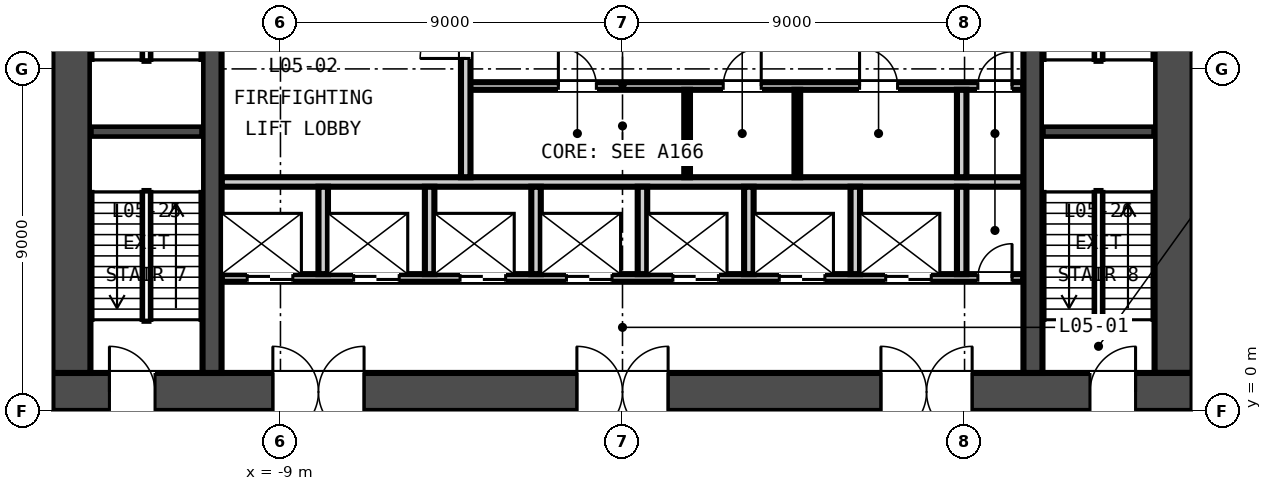
"""IFC4 building model, lengths in metres.
Left out: names, types, materials, properties, quantities, classifications, styles, units other than length and angle.
Written with IfcOpenShell. Run it as: python <this file> out.ifc"""

import sys

from ifc_helpers import new_model, si_unit, direction, frame, frame_2d, origin, place, context, subcontext, project, spatial, rectangle, extrude, element, fill, save


model = new_model("IFC4")
c1 = context("Model", 3, precision=1e-05, world=origin(), true_north=direction((0.0, 1.0)))
c2 = subcontext(c1, "Body", "Model", "MODEL_VIEW")
j1 = project(units=[si_unit("LENGTHUNIT", "METRE"), si_unit("PLANEANGLEUNIT", "RADIAN")], contexts=[c1])
p1 = place(None, origin())
s1 = spatial("IfcSite", under=j1, at=p1, CompositionType="ELEMENT")
p2 = place(p1, origin())
s2 = spatial("IfcBuilding", under=s1, at=p2, CompositionType="ELEMENT")
p3 = place(p2, frame((0.0, 0.0, 31.5)))
s3 = spatial("IfcBuildingStorey", under=s2, at=p3, CompositionType="ELEMENT", Elevation=31.5)
p4 = place(p3, frame((-15.0, 0.5, -0.3), z_axis=(0.0, 0.0, 1.0), x_axis=(1.0, 0.0, 0.0)))
e1 = element("IfcWall", 1, at=p4, inside=s3, PredefinedType="SOLIDWALL", context=c2, shape_type="SweptSolid", body=[
    extrude(rectangle(XDim=30.0, YDim=1.0, at=frame_2d((15.0, 0.0))), origin(), (0.0, 0.0, 1.0), 4.65),
])
p5 = place(p4, frame((5.8, 0.0, 0.3)))
e2 = element("IfcOpeningElement", 2, at=p5, cuts=e1, PredefinedType="OPENING", context=c2, shape_type="SweptSolid", body=[
    extrude(rectangle(XDim=2.4, YDim=2.4, at=frame_2d((1.2, 1.2))), frame((0.0, 0.51, 0.0), z_axis=(0.0, -1.0, 0.0), x_axis=(1.0, 0.0, 0.0)), (0.0, 0.0, 1.0), 1.02),
])
p6 = place(p4, frame((13.8, 0.0, 0.3)))
e3 = element("IfcOpeningElement", 3, at=p6, cuts=e1, PredefinedType="OPENING", context=c2, shape_type="SweptSolid", body=[
    extrude(rectangle(XDim=2.4, YDim=2.4, at=frame_2d((1.2, 1.2))), frame((0.0, 0.51, 0.0), z_axis=(0.0, -1.0, 0.0), x_axis=(1.0, 0.0, 0.0)), (0.0, 0.0, 1.0), 1.02),
])
p7 = place(p4, frame((21.8, 0.0, 0.3)))
e4 = element("IfcOpeningElement", 4, at=p7, cuts=e1, PredefinedType="OPENING", context=c2, shape_type="SweptSolid", body=[
    extrude(rectangle(XDim=2.4, YDim=2.4, at=frame_2d((1.2, 1.2))), frame((0.0, 0.51, 0.0), z_axis=(0.0, -1.0, 0.0), x_axis=(1.0, 0.0, 0.0)), (0.0, 0.0, 1.0), 1.02),
])
p8 = place(p4, frame((1.5, 0.0, 0.3)))
e5 = element("IfcOpeningElement", 5, at=p8, cuts=e1, PredefinedType="OPENING", context=c2, shape_type="SweptSolid", body=[
    extrude(rectangle(XDim=1.2, YDim=2.1, at=frame_2d((0.6, 1.05))), frame((0.0, 0.51, 0.0), z_axis=(0.0, -1.0, 0.0), x_axis=(1.0, 0.0, 0.0)), (0.0, 0.0, 1.0), 1.02),
])
p9 = place(p4, frame((27.3, 0.0, 0.3)))
e6 = element("IfcOpeningElement", 6, at=p9, cuts=e1, PredefinedType="OPENING", context=c2, shape_type="SweptSolid", body=[
    extrude(rectangle(XDim=1.2, YDim=2.1, at=frame_2d((0.6, 1.05))), frame((0.0, 0.51, 0.0), z_axis=(0.0, -1.0, 0.0), x_axis=(1.0, 0.0, 0.0)), (0.0, 0.0, 1.0), 1.02),
])
for number, where, z_axis, x_axis in (
    (7, (-14.5, 1.0, -0.3), (0.0, 0.0, 1.0), (0.0, 1.0, 0.0)),
    (8, (14.5, 1.0, -0.3), (0.0, 0.0, 1.0), (0.0, 1.0, 0.0)),
):
    element("IfcWall", number, at=place(p3, frame(where, z_axis=z_axis, x_axis=x_axis)), inside=s3, PredefinedType="SOLIDWALL", context=c2, shape_type="SweptSolid", body=[
        extrude(rectangle(XDim=13.0, YDim=1.0, at=frame_2d((6.5, 0.0))), origin(), (0.0, 0.0, 1.0), 4.65),
    ])
for number, where, z_axis, x_axis in (
    (9, (-10.8, 1.0, -0.3), (0.0, 0.0, 1.0), (0.0, 1.0, 0.0)),
    (10, (10.8, 1.0, -0.3), (0.0, 0.0, 1.0), (0.0, 1.0, 0.0)),
):
    element("IfcWall", number, at=place(p3, frame(where, z_axis=z_axis, x_axis=x_axis)), inside=s3, PredefinedType="SOLIDWALL", context=c2, shape_type="SweptSolid", body=[
        extrude(rectangle(XDim=13.0, YDim=0.5, at=frame_2d((6.5, 0.0))), origin(), (0.0, 0.0, 1.0), 4.65),
    ])
p10 = place(p3, frame((-10.55, 3.5, 0.0), z_axis=(0.0, 0.0, 1.0), x_axis=(1.0, 0.0, 0.0)))
e11 = element("IfcWall", 11, at=p10, inside=s3, PredefinedType="PARTITIONING", context=c2, shape_type="SweptSolid", body=[
    extrude(rectangle(XDim=21.1, YDim=0.2, at=frame_2d((10.55, 0.0))), origin(), (0.0, 0.0, 1.0), 4.35),
])
p11 = place(p10, frame((0.675, 0.0, 0.0)))
e12 = element("IfcOpeningElement", 12, at=p11, cuts=e11, PredefinedType="OPENING", context=c2, shape_type="SweptSolid", body=[
    extrude(rectangle(XDim=1.2, YDim=2.1, at=frame_2d((0.6, 1.05))), frame((0.0, 0.11, 0.0), z_axis=(0.0, -1.0, 0.0), x_axis=(1.0, 0.0, 0.0)), (0.0, 0.0, 1.0), 0.22),
])
p12 = place(p10, frame((3.475, 0.0, 0.0)))
e13 = element("IfcOpeningElement", 13, at=p12, cuts=e11, PredefinedType="OPENING", context=c2, shape_type="SweptSolid", body=[
    extrude(rectangle(XDim=1.2, YDim=2.1, at=frame_2d((0.6, 1.05))), frame((0.0, 0.11, 0.0), z_axis=(0.0, -1.0, 0.0), x_axis=(1.0, 0.0, 0.0)), (0.0, 0.0, 1.0), 0.22),
])
p13 = place(p10, frame((6.275, 0.0, 0.0)))
e14 = element("IfcOpeningElement", 14, at=p13, cuts=e11, PredefinedType="OPENING", context=c2, shape_type="SweptSolid", body=[
    extrude(rectangle(XDim=1.2, YDim=2.1, at=frame_2d((0.6, 1.05))), frame((0.0, 0.11, 0.0), z_axis=(0.0, -1.0, 0.0), x_axis=(1.0, 0.0, 0.0)), (0.0, 0.0, 1.0), 0.22),
])
p14 = place(p10, frame((9.075, 0.0, 0.0)))
e15 = element("IfcOpeningElement", 15, at=p14, cuts=e11, PredefinedType="OPENING", context=c2, shape_type="SweptSolid", body=[
    extrude(rectangle(XDim=1.2, YDim=2.1, at=frame_2d((0.6, 1.05))), frame((0.0, 0.11, 0.0), z_axis=(0.0, -1.0, 0.0), x_axis=(1.0, 0.0, 0.0)), (0.0, 0.0, 1.0), 0.22),
])
p15 = place(p10, frame((11.875, 0.0, 0.0)))
e16 = element("IfcOpeningElement", 16, at=p15, cuts=e11, PredefinedType="OPENING", context=c2, shape_type="SweptSolid", body=[
    extrude(rectangle(XDim=1.2, YDim=2.1, at=frame_2d((0.6, 1.05))), frame((0.0, 0.11, 0.0), z_axis=(0.0, -1.0, 0.0), x_axis=(1.0, 0.0, 0.0)), (0.0, 0.0, 1.0), 0.22),
])
p16 = place(p10, frame((14.675, 0.0, 0.0)))
e17 = element("IfcOpeningElement", 17, at=p16, cuts=e11, PredefinedType="OPENING", context=c2, shape_type="SweptSolid", body=[
    extrude(rectangle(XDim=1.2, YDim=2.1, at=frame_2d((0.6, 1.05))), frame((0.0, 0.11, 0.0), z_axis=(0.0, -1.0, 0.0), x_axis=(1.0, 0.0, 0.0)), (0.0, 0.0, 1.0), 0.22),
])
p17 = place(p10, frame((17.475, 0.0, 0.0)))
e18 = element("IfcOpeningElement", 18, at=p17, cuts=e11, PredefinedType="OPENING", context=c2, shape_type="SweptSolid", body=[
    extrude(rectangle(XDim=1.2, YDim=2.1, at=frame_2d((0.6, 1.05))), frame((0.0, 0.11, 0.0), z_axis=(0.0, -1.0, 0.0), x_axis=(1.0, 0.0, 0.0)), (0.0, 0.0, 1.0), 0.22),
])
p18 = place(p10, frame((19.9, 0.0, 0.0)))
e19 = element("IfcOpeningElement", 19, at=p18, cuts=e11, PredefinedType="OPENING", context=c2, shape_type="SweptSolid", body=[
    extrude(rectangle(XDim=0.9, YDim=2.1, at=frame_2d((0.45, 1.05))), frame((0.0, 0.11, 0.0), z_axis=(0.0, -1.0, 0.0), x_axis=(1.0, 0.0, 0.0)), (0.0, 0.0, 1.0), 0.22),
])
p19 = place(p3, frame((-10.55, 6.025, 0.0), z_axis=(0.0, 0.0, 1.0), x_axis=(1.0, 0.0, 0.0)))
e20 = element("IfcWall", 20, at=p19, inside=s3, PredefinedType="PARTITIONING", context=c2, shape_type="SweptSolid", body=[
    extrude(rectangle(XDim=21.1, YDim=0.25, at=frame_2d((10.55, 0.0))), origin(), (0.0, 0.0, 1.0), 4.35),
])
p20 = place(p3, frame((-4.125, 8.55, 0.0), z_axis=(0.0, 0.0, 1.0), x_axis=(1.0, 0.0, 0.0)))
e21 = element("IfcWall", 21, at=p20, inside=s3, PredefinedType="PARTITIONING", context=c2, shape_type="SweptSolid", body=[
    extrude(rectangle(XDim=14.675, YDim=0.2, at=frame_2d((7.337, 0.0))), origin(), (0.0, 0.0, 1.0), 4.35),
])
p21 = place(p20, frame((2.438, 0.0, 0.0)))
e22 = element("IfcOpeningElement", 22, at=p21, cuts=e21, PredefinedType="OPENING", context=c2, shape_type="SweptSolid", body=[
    extrude(rectangle(XDim=1.0, YDim=2.1, at=frame_2d((0.5, 1.05))), frame((0.0, 0.11, 0.0), z_axis=(0.0, -1.0, 0.0), x_axis=(1.0, 0.0, 0.0)), (0.0, 0.0, 1.0), 0.22),
])
p22 = place(p20, frame((6.775, 0.0, 0.0)))
e23 = element("IfcOpeningElement", 23, at=p22, cuts=e21, PredefinedType="OPENING", context=c2, shape_type="SweptSolid", body=[
    extrude(rectangle(XDim=1.0, YDim=2.1, at=frame_2d((0.5, 1.05))), frame((0.0, 0.11, 0.0), z_axis=(0.0, -1.0, 0.0), x_axis=(1.0, 0.0, 0.0)), (0.0, 0.0, 1.0), 0.22),
])
p23 = place(p20, frame((10.363, 0.0, 0.0)))
e24 = element("IfcOpeningElement", 24, at=p23, cuts=e21, PredefinedType="OPENING", context=c2, shape_type="SweptSolid", body=[
    extrude(rectangle(XDim=1.0, YDim=2.1, at=frame_2d((0.5, 1.05))), frame((0.0, 0.11, 0.0), z_axis=(0.0, -1.0, 0.0), x_axis=(1.0, 0.0, 0.0)), (0.0, 0.0, 1.0), 0.22),
])
p24 = place(p20, frame((13.475, 0.0, 0.0)))
e25 = element("IfcOpeningElement", 25, at=p24, cuts=e21, PredefinedType="OPENING", context=c2, shape_type="SweptSolid", body=[
    extrude(rectangle(XDim=0.9, YDim=2.1, at=frame_2d((0.45, 1.05))), frame((0.0, 0.11, 0.0), z_axis=(0.0, -1.0, 0.0), x_axis=(1.0, 0.0, 0.0)), (0.0, 0.0, 1.0), 0.22),
])
p25 = place(p3, frame((-4.125, 6.15, 0.0), z_axis=(0.0, 0.0, 1.0), x_axis=(0.0, 1.0, 0.0)))
e26 = element("IfcWall", 26, at=p25, inside=s3, PredefinedType="PARTITIONING", context=c2, shape_type="SweptSolid", body=[
    extrude(rectangle(XDim=4.95, YDim=0.25, at=frame_2d((2.475, 0.0))), origin(), (0.0, 0.0, 1.0), 4.35),
])
p26 = place(p25, frame((3.125, 0.0, 0.0)))
e27 = element("IfcOpeningElement", 27, at=p26, cuts=e26, PredefinedType="OPENING", context=c2, shape_type="SweptSolid", body=[
    extrude(rectangle(XDim=1.2, YDim=2.1, at=frame_2d((0.6, 1.05))), frame((0.0, 0.135, 0.0), z_axis=(0.0, -1.0, 0.0), x_axis=(1.0, 0.0, 0.0)), (0.0, 0.0, 1.0), 0.27),
])
for number, where, z_axis, x_axis in (
    (28, (-7.875, 3.6, 0.0), (0.0, 0.0, 1.0), (0.0, 1.0, 0.0)),
    (29, (-5.075, 3.6, 0.0), (0.0, 0.0, 1.0), (0.0, 1.0, 0.0)),
    (30, (-2.275, 3.6, 0.0), (0.0, 0.0, 1.0), (0.0, 1.0, 0.0)),
    (31, (0.525, 3.6, 0.0), (0.0, 0.0, 1.0), (0.0, 1.0, 0.0)),
    (32, (3.325, 3.6, 0.0), (0.0, 0.0, 1.0), (0.0, 1.0, 0.0)),
    (33, (6.125, 3.6, 0.0), (0.0, 0.0, 1.0), (0.0, 1.0, 0.0)),
    (34, (8.925, 3.6, 0.0), (0.0, 0.0, 1.0), (0.0, 1.0, 0.0)),
):
    element("IfcWall", number, at=place(p3, frame(where, z_axis=z_axis, x_axis=x_axis)), inside=s3, PredefinedType="PARTITIONING", context=c2, shape_type="SweptSolid", body=[
        extrude(rectangle(XDim=2.3, YDim=0.25, at=frame_2d((1.15, 0.0))), origin(), (0.0, 0.0, 1.0), 4.35),
    ])
for number, where, z_axis, x_axis in (
    (35, (1.7, 6.15, 0.0), (0.0, 0.0, 1.0), (0.0, 1.0, 0.0)),
    (36, (4.6, 6.15, 0.0), (0.0, 0.0, 1.0), (0.0, 1.0, 0.0)),
):
    element("IfcWall", number, at=place(p3, frame(where, z_axis=z_axis, x_axis=x_axis)), inside=s3, PredefinedType="PARTITIONING", context=c2, shape_type="SweptSolid", body=[
        extrude(rectangle(XDim=2.3, YDim=0.15, at=frame_2d((1.15, 0.0))), origin(), (0.0, 0.0, 1.0), 4.35),
    ])
p27 = place(p3, frame((8.925, 6.15, 0.0), z_axis=(0.0, 0.0, 1.0), x_axis=(0.0, 1.0, 0.0)))
e37 = element("IfcWall", 37, at=p27, inside=s3, PredefinedType="PARTITIONING", context=c2, shape_type="SweptSolid", body=[
    extrude(rectangle(XDim=2.3, YDim=0.25, at=frame_2d((1.15, 0.0))), origin(), (0.0, 0.0, 1.0), 4.35),
])
for number, where, z_axis, x_axis in (
    (38, (-14.0, 7.35, -0.3), (0.0, 0.0, 1.0), (1.0, 0.0, 0.0)),
    (39, (11.05, 7.35, -0.3), (0.0, 0.0, 1.0), (1.0, 0.0, 0.0)),
):
    element("IfcWall", number, at=place(p3, frame(where, z_axis=z_axis, x_axis=x_axis)), inside=s3, PredefinedType="SOLIDWALL", context=c2, shape_type="SweptSolid", body=[
        extrude(rectangle(XDim=2.95, YDim=0.3, at=frame_2d((1.475, 0.0))), origin(), (0.0, 0.0, 1.0), 4.65),
    ])
p28 = place(p26, origin())
e40 = element("IfcDoor", 40, at=p28, inside=s3, OperationType="SINGLE_SWING_LEFT", PredefinedType="DOOR", context=c2, shape_type="SweptSolid", body=[
    extrude(rectangle(XDim=1.2, YDim=2.1, at=frame_2d((0.6, 1.05))), frame((0.0, 0.025, 0.0), z_axis=(0.0, -1.0, 0.0), x_axis=(1.0, 0.0, 0.0)), (0.0, 0.0, 1.0), 0.05),
])
fill(e27, e40)
p29 = place(p11, origin())
e41 = element("IfcDoor", 41, at=p29, inside=s3, OperationType="DOUBLE_DOOR_SLIDING", PredefinedType="DOOR", context=c2, shape_type="SweptSolid", body=[
    extrude(rectangle(XDim=1.2, YDim=2.1, at=frame_2d((0.6, 1.05))), frame((0.0, 0.025, 0.0), z_axis=(0.0, -1.0, 0.0), x_axis=(1.0, 0.0, 0.0)), (0.0, 0.0, 1.0), 0.05),
])
fill(e12, e41)
p30 = place(p12, origin())
e42 = element("IfcDoor", 42, at=p30, inside=s3, OperationType="DOUBLE_DOOR_SLIDING", PredefinedType="DOOR", context=c2, shape_type="SweptSolid", body=[
    extrude(rectangle(XDim=1.2, YDim=2.1, at=frame_2d((0.6, 1.05))), frame((0.0, 0.025, 0.0), z_axis=(0.0, -1.0, 0.0), x_axis=(1.0, 0.0, 0.0)), (0.0, 0.0, 1.0), 0.05),
])
fill(e13, e42)
p31 = place(p13, origin())
e43 = element("IfcDoor", 43, at=p31, inside=s3, OperationType="DOUBLE_DOOR_SLIDING", PredefinedType="DOOR", context=c2, shape_type="SweptSolid", body=[
    extrude(rectangle(XDim=1.2, YDim=2.1, at=frame_2d((0.6, 1.05))), frame((0.0, 0.025, 0.0), z_axis=(0.0, -1.0, 0.0), x_axis=(1.0, 0.0, 0.0)), (0.0, 0.0, 1.0), 0.05),
])
fill(e14, e43)
p32 = place(p14, origin())
e44 = element("IfcDoor", 44, at=p32, inside=s3, OperationType="DOUBLE_DOOR_SLIDING", PredefinedType="DOOR", context=c2, shape_type="SweptSolid", body=[
    extrude(rectangle(XDim=1.2, YDim=2.1, at=frame_2d((0.6, 1.05))), frame((0.0, 0.025, 0.0), z_axis=(0.0, -1.0, 0.0), x_axis=(1.0, 0.0, 0.0)), (0.0, 0.0, 1.0), 0.05),
])
fill(e15, e44)
p33 = place(p15, origin())
e45 = element("IfcDoor", 45, at=p33, inside=s3, OperationType="DOUBLE_DOOR_SLIDING", PredefinedType="DOOR", context=c2, shape_type="SweptSolid", body=[
    extrude(rectangle(XDim=1.2, YDim=2.1, at=frame_2d((0.6, 1.05))), frame((0.0, 0.025, 0.0), z_axis=(0.0, -1.0, 0.0), x_axis=(1.0, 0.0, 0.0)), (0.0, 0.0, 1.0), 0.05),
])
fill(e16, e45)
p34 = place(p16, origin())
e46 = element("IfcDoor", 46, at=p34, inside=s3, OperationType="DOUBLE_DOOR_SLIDING", PredefinedType="DOOR", context=c2, shape_type="SweptSolid", body=[
    extrude(rectangle(XDim=1.2, YDim=2.1, at=frame_2d((0.6, 1.05))), frame((0.0, 0.025, 0.0), z_axis=(0.0, -1.0, 0.0), x_axis=(1.0, 0.0, 0.0)), (0.0, 0.0, 1.0), 0.05),
])
fill(e17, e46)
p35 = place(p17, origin())
e47 = element("IfcDoor", 47, at=p35, inside=s3, OperationType="DOUBLE_DOOR_SLIDING", PredefinedType="DOOR", context=c2, shape_type="SweptSolid", body=[
    extrude(rectangle(XDim=1.2, YDim=2.1, at=frame_2d((0.6, 1.05))), frame((0.0, 0.025, 0.0), z_axis=(0.0, -1.0, 0.0), x_axis=(1.0, 0.0, 0.0)), (0.0, 0.0, 1.0), 0.05),
])
fill(e18, e47)
p36 = place(p18, origin())
e48 = element("IfcDoor", 48, at=p36, inside=s3, OperationType="SINGLE_SWING_RIGHT", PredefinedType="DOOR", context=c2, shape_type="SweptSolid", body=[
    extrude(rectangle(XDim=0.9, YDim=2.1, at=frame_2d((0.45, 1.05))), frame((0.0, 0.025, 0.0), z_axis=(0.0, -1.0, 0.0), x_axis=(1.0, 0.0, 0.0)), (0.0, 0.0, 1.0), 0.05),
])
fill(e19, e48)
p37 = place(p21, origin())
e49 = element("IfcDoor", 49, at=p37, inside=s3, OperationType="SINGLE_SWING_LEFT", PredefinedType="DOOR", context=c2, shape_type="SweptSolid", body=[
    extrude(rectangle(XDim=1.0, YDim=2.1, at=frame_2d((0.5, 1.05))), frame((0.0, 0.025, 0.0), z_axis=(0.0, -1.0, 0.0), x_axis=(1.0, 0.0, 0.0)), (0.0, 0.0, 1.0), 0.05),
])
fill(e22, e49)
p38 = place(p22, origin())
e50 = element("IfcDoor", 50, at=p38, inside=s3, OperationType="SINGLE_SWING_RIGHT", PredefinedType="DOOR", context=c2, shape_type="SweptSolid", body=[
    extrude(rectangle(XDim=1.0, YDim=2.1, at=frame_2d((0.5, 1.05))), frame((0.0, 0.025, 0.0), z_axis=(0.0, -1.0, 0.0), x_axis=(1.0, 0.0, 0.0)), (0.0, 0.0, 1.0), 0.05),
])
fill(e23, e50)
p39 = place(p23, origin())
e51 = element("IfcDoor", 51, at=p39, inside=s3, OperationType="SINGLE_SWING_LEFT", PredefinedType="DOOR", context=c2, shape_type="SweptSolid", body=[
    extrude(rectangle(XDim=1.0, YDim=2.1, at=frame_2d((0.5, 1.05))), frame((0.0, 0.025, 0.0), z_axis=(0.0, -1.0, 0.0), x_axis=(1.0, 0.0, 0.0)), (0.0, 0.0, 1.0), 0.05),
])
fill(e24, e51)
p40 = place(p24, origin())
e52 = element("IfcDoor", 52, at=p40, inside=s3, OperationType="SINGLE_SWING_RIGHT", PredefinedType="DOOR", context=c2, shape_type="SweptSolid", body=[
    extrude(rectangle(XDim=0.9, YDim=2.1, at=frame_2d((0.45, 1.05))), frame((0.0, 0.025, 0.0), z_axis=(0.0, -1.0, 0.0), x_axis=(1.0, 0.0, 0.0)), (0.0, 0.0, 1.0), 0.05),
])
fill(e25, e52)
p41 = place(p5, origin())
e53 = element("IfcDoor", 53, at=p41, inside=s3, OperationType="DOUBLE_DOOR_DOUBLE_SWING", PredefinedType="DOOR", context=c2, shape_type="SweptSolid", body=[
    extrude(rectangle(XDim=2.4, YDim=2.4, at=frame_2d((1.2, 1.2))), frame((0.0, 0.025, 0.0), z_axis=(0.0, -1.0, 0.0), x_axis=(1.0, 0.0, 0.0)), (0.0, 0.0, 1.0), 0.05),
])
fill(e2, e53)
p42 = place(p6, origin())
e54 = element("IfcDoor", 54, at=p42, inside=s3, OperationType="DOUBLE_DOOR_DOUBLE_SWING", PredefinedType="DOOR", context=c2, shape_type="SweptSolid", body=[
    extrude(rectangle(XDim=2.4, YDim=2.4, at=frame_2d((1.2, 1.2))), frame((0.0, 0.025, 0.0), z_axis=(0.0, -1.0, 0.0), x_axis=(1.0, 0.0, 0.0)), (0.0, 0.0, 1.0), 0.05),
])
fill(e3, e54)
p43 = place(p7, origin())
e55 = element("IfcDoor", 55, at=p43, inside=s3, OperationType="DOUBLE_DOOR_DOUBLE_SWING", PredefinedType="DOOR", context=c2, shape_type="SweptSolid", body=[
    extrude(rectangle(XDim=2.4, YDim=2.4, at=frame_2d((1.2, 1.2))), frame((0.0, 0.025, 0.0), z_axis=(0.0, -1.0, 0.0), x_axis=(1.0, 0.0, 0.0)), (0.0, 0.0, 1.0), 0.05),
])
fill(e4, e55)
p44 = place(p8, origin())
e56 = element("IfcDoor", 56, at=p44, inside=s3, OperationType="SINGLE_SWING_LEFT", PredefinedType="DOOR", context=c2, shape_type="SweptSolid", body=[
    extrude(rectangle(XDim=1.2, YDim=2.1, at=frame_2d((0.6, 1.05))), frame((0.0, 0.025, 0.0), z_axis=(0.0, -1.0, 0.0), x_axis=(1.0, 0.0, 0.0)), (0.0, 0.0, 1.0), 0.05),
])
fill(e5, e56)
p45 = place(p9, origin())
e57 = element("IfcDoor", 57, at=p45, inside=s3, OperationType="SINGLE_SWING_RIGHT", PredefinedType="DOOR", context=c2, shape_type="SweptSolid", body=[
    extrude(rectangle(XDim=1.2, YDim=2.1, at=frame_2d((0.6, 1.05))), frame((0.0, 0.025, 0.0), z_axis=(0.0, -1.0, 0.0), x_axis=(1.0, 0.0, 0.0)), (0.0, 0.0, 1.0), 0.05),
])
fill(e6, e57)
save(model, sys.argv[1])
